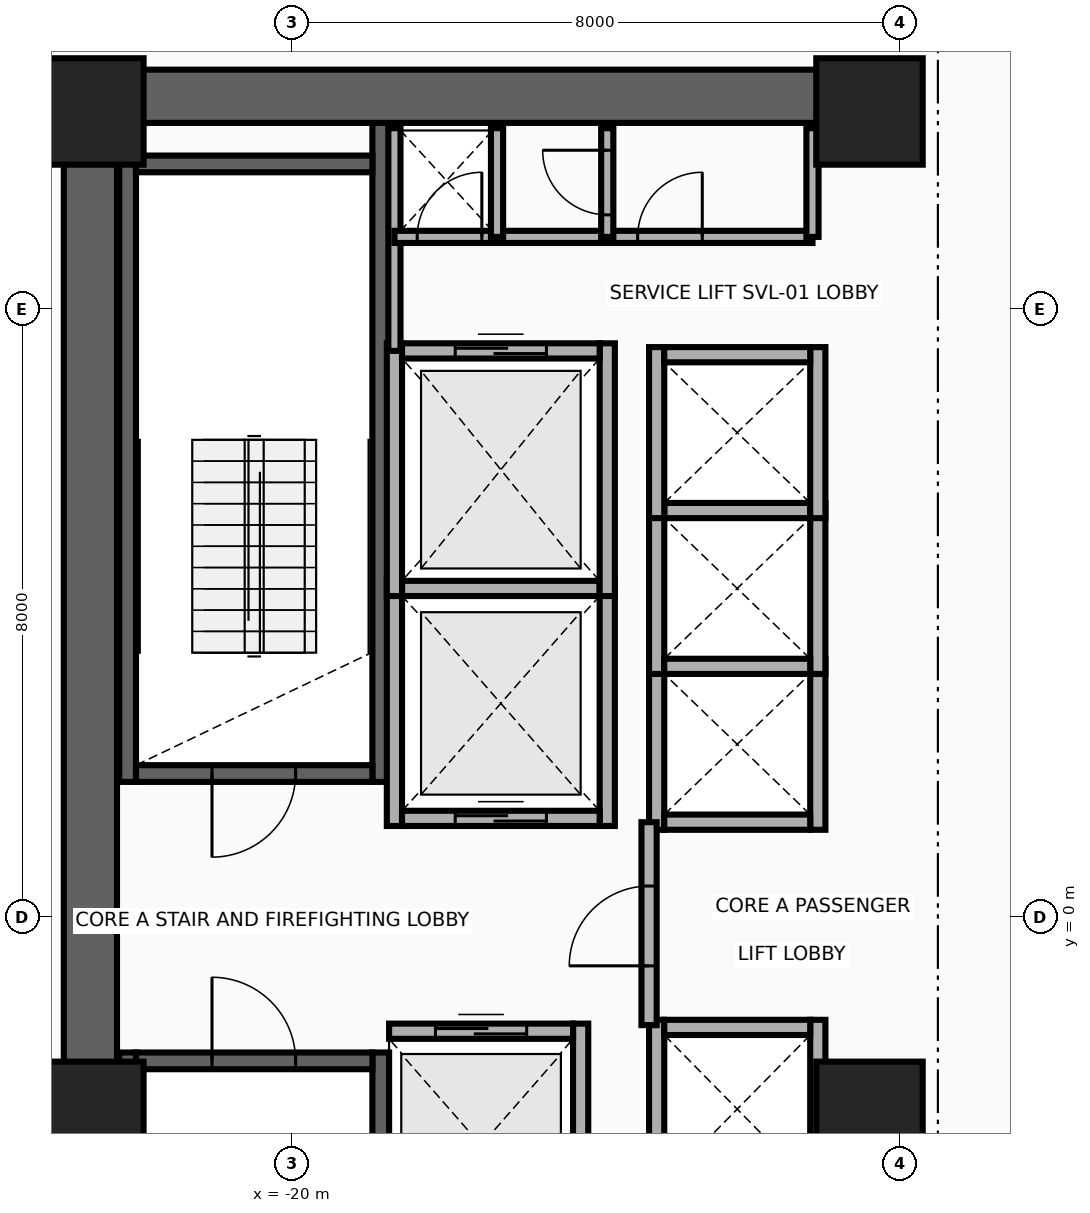
"""IFC4 building model, lengths in metres.
Left out: names, types, materials, properties, quantities, classifications, styles, units other than length and angle.
Written with IfcOpenShell. Run it as: python <this file> out.ifc"""

import sys

from ifc_helpers import new_model, si_unit, direction, frame, frame_2d, origin, origin_2d, place, context, subcontext, project, spatial, rectangle, extrude, source, transform, mapped, element, fill, save


model = new_model("IFC4")
c1 = context("Model", 3, precision=1e-05, world=origin(), true_north=direction((0.0, 1.0)))
c2 = subcontext(c1, "Body", "Model", "MODEL_VIEW")
j1 = project(units=[si_unit("LENGTHUNIT", "METRE"), si_unit("PLANEANGLEUNIT", "RADIAN")], contexts=[c1])
p1 = place(None, origin())
s1 = spatial("IfcSite", under=j1, at=p1, CompositionType="ELEMENT")
p2 = place(p1, origin())
s2 = spatial("IfcBuilding", under=s1, at=p2, CompositionType="ELEMENT")
p3 = place(p2, frame((0.0, 0.0, 88.9)))
s3 = spatial("IfcBuildingStorey", under=s2, at=p3, CompositionType="ELEMENT", Elevation=88.9)
for number, where, z_axis, x_axis in (
    (1, (-22.16, 1.78, 0.0), (0.0, 0.0, 1.0), (0.0, 1.0, 0.0)),
    (2, (-18.83, 1.78, 0.0), (0.0, 0.0, 1.0), (0.0, 1.0, 0.0)),
):
    element("IfcWall", number, at=place(p3, frame(where, z_axis=z_axis, x_axis=x_axis)), inside=s3, PredefinedType="SHEAR", context=c2, shape_type="SweptSolid", body=[
        extrude(rectangle(XDim=8.67, YDim=0.22, at=frame_2d((4.335, 0.0))), origin(), (0.0, 0.0, 1.0), 3.46),
    ])
p4 = place(p3, frame((-22.05, 1.89, 0.0), z_axis=(0.0, 0.0, 1.0), x_axis=(1.0, 0.0, 0.0)))
e3 = element("IfcWall", 3, at=p4, inside=s3, PredefinedType="SHEAR", context=c2, shape_type="SweptSolid", body=[
    extrude(rectangle(XDim=3.11, YDim=0.22, at=frame_2d((1.555, 0.0))), origin(), (0.0, 0.0, 1.0), 3.46),
])
p5 = place(p4, frame((1.0, 0.0, 0.0)))
e4 = element("IfcOpeningElement", 4, at=p5, cuts=e3, PredefinedType="OPENING", context=c2, shape_type="SweptSolid", body=[
    extrude(rectangle(XDim=1.1, YDim=2.15, at=frame_2d((0.55, 1.075))), frame((0.0, 0.125, 0.0), z_axis=(0.0, -1.0, 0.0), x_axis=(1.0, 0.0, 0.0)), (0.0, 0.0, 1.0), 0.25),
])
p6 = place(p3, frame((-22.05, 9.91, 0.0), z_axis=(0.0, 0.0, 1.0), x_axis=(1.0, 0.0, 0.0)))
e5 = element("IfcWall", 5, at=p6, inside=s3, PredefinedType="SHEAR", context=c2, shape_type="SweptSolid", body=[
    extrude(rectangle(XDim=3.11, YDim=0.22, at=frame_2d((1.555, 0.0))), origin(), (0.0, 0.0, 1.0), 3.46),
])
for number, where, z_axis, x_axis in (
    (6, (-22.16, -10.45, 0.0), (0.0, 0.0, 1.0), (0.0, 1.0, 0.0)),
    (7, (-18.83, -10.45, 0.0), (0.0, 0.0, 1.0), (0.0, 1.0, 0.0)),
):
    element("IfcWall", number, at=place(p3, frame(where, z_axis=z_axis, x_axis=x_axis)), inside=s3, PredefinedType="SHEAR", context=c2, shape_type="SweptSolid", body=[
        extrude(rectangle(XDim=8.67, YDim=0.22, at=frame_2d((4.335, 0.0))), origin(), (0.0, 0.0, 1.0), 3.46),
    ])
p7 = place(p3, frame((-22.05, -1.89, 0.0), z_axis=(0.0, 0.0, 1.0), x_axis=(1.0, 0.0, 0.0)))
e8 = element("IfcWall", 8, at=p7, inside=s3, PredefinedType="SHEAR", context=c2, shape_type="SweptSolid", body=[
    extrude(rectangle(XDim=3.11, YDim=0.22, at=frame_2d((1.555, 0.0))), origin(), (0.0, 0.0, 1.0), 3.46),
])
p8 = place(p7, frame((1.0, 0.0, 0.0)))
e9 = element("IfcOpeningElement", 9, at=p8, cuts=e8, PredefinedType="OPENING", context=c2, shape_type="SweptSolid", body=[
    extrude(rectangle(XDim=1.1, YDim=2.15, at=frame_2d((0.55, 1.075))), frame((0.0, 0.125, 0.0), z_axis=(0.0, -1.0, 0.0), x_axis=(1.0, 0.0, 0.0)), (0.0, 0.0, 1.0), 0.25),
])
p9 = place(p3, frame((-22.65, -11.15, 0.0), z_axis=(0.0, 0.0, 1.0), x_axis=(0.0, 1.0, 0.0)))
e10 = element("IfcWall", 10, at=p9, inside=s3, PredefinedType="SHEAR", context=c2, shape_type="SweptSolid", body=[
    extrude(rectangle(XDim=22.3, YDim=0.7, at=frame_2d((11.15, 0.0))), origin(), (0.0, 0.0, 1.0), 3.46),
])
p10 = place(p3, frame((-22.65, 10.8, 0.0), z_axis=(0.0, 0.0, 1.0), x_axis=(1.0, 0.0, 0.0)))
e11 = element("IfcWall", 11, at=p10, inside=s3, PredefinedType="SHEAR", context=c2, shape_type="SweptSolid", body=[
    extrude(rectangle(XDim=10.25, YDim=0.7, at=frame_2d((5.125, 0.0))), origin(), (0.0, 0.0, 1.0), 3.46),
])
m1 = source(origin(), c2, "Body", "SweptSolid", [
    extrude(rectangle(XDim=1.4, YDim=1.4, at=origin_2d()), origin(), (0.0, 0.0, 1.0), 3.7),
])
for number, where, z_axis, x_axis in (
    (12, (-22.65, -2.6, 0.0), (0.0, 0.0, 1.0), (1.0, 0.0, 0.0)),
    (13, (-12.4, -2.6, 0.0), (0.0, 0.0, 1.0), (1.0, 0.0, 0.0)),
    (14, (-22.65, 10.6, 0.0), (0.0, 0.0, 1.0), (1.0, 0.0, 0.0)),
    (15, (-12.4, 10.6, 0.0), (0.0, 0.0, 1.0), (1.0, 0.0, 0.0)),
):
    element("IfcColumn", number, at=place(p3, frame(where, z_axis=z_axis, x_axis=x_axis)), inside=s3, PredefinedType="COLUMN", context=c2, shape_type="MappedRepresentation", body=[
        mapped(m1, transform((0.0, 0.0, 0.0), x_axis=(1.0, 0.0, 0.0), y_axis=(0.0, 1.0, 0.0), z_axis=(0.0, 0.0, 1.0), scale=1.0)),
    ])
for number, where, z_axis, x_axis in (
    (16, (-18.65, 1.2, 0.0), (0.0, 0.0, 1.0), (0.0, 1.0, 0.0)),
    (17, (-15.85, 1.2, 0.0), (0.0, 0.0, 1.0), (0.0, 1.0, 0.0)),
):
    element("IfcWall", number, at=place(p3, frame(where, z_axis=z_axis, x_axis=x_axis)), inside=s3, PredefinedType="MOVABLE", context=c2, shape_type="SweptSolid", body=[
        extrude(rectangle(XDim=3.225, YDim=0.2, at=frame_2d((1.613, 0.0))), origin(), (0.0, 0.0, 1.0), 3.46),
    ])
p11 = place(p3, frame((-18.55, 1.3, 0.0), z_axis=(0.0, 0.0, 1.0), x_axis=(1.0, 0.0, 0.0)))
e18 = element("IfcWall", 18, at=p11, inside=s3, PredefinedType="MOVABLE", context=c2, shape_type="SweptSolid", body=[
    extrude(rectangle(XDim=2.6, YDim=0.2, at=frame_2d((1.3, 0.0))), origin(), (0.0, 0.0, 1.0), 3.46),
])
p12 = place(p11, frame((0.7, 0.0, 0.0)))
e19 = element("IfcOpeningElement", 19, at=p12, cuts=e18, PredefinedType="OPENING", context=c2, shape_type="SweptSolid", body=[
    extrude(rectangle(XDim=1.2, YDim=2.1, at=frame_2d((0.6, 1.05))), frame((0.0, 0.115, 0.0), z_axis=(0.0, -1.0, 0.0), x_axis=(1.0, 0.0, 0.0)), (0.0, 0.0, 1.0), 0.23),
])
p13 = place(p3, frame((-18.55, 4.325, 0.0), z_axis=(0.0, 0.0, 1.0), x_axis=(1.0, 0.0, 0.0)))
e20 = element("IfcWall", 20, at=p13, inside=s3, PredefinedType="MOVABLE", context=c2, shape_type="SweptSolid", body=[
    extrude(rectangle(XDim=2.6, YDim=0.2, at=frame_2d((1.3, 0.0))), origin(), (0.0, 0.0, 1.0), 3.46),
])
p14 = place(p3, frame((-16.2, -4.6, 0.0), z_axis=(0.0, 0.0, 1.0), x_axis=(0.0, 1.0, 0.0)))
e21 = element("IfcWall", 21, at=p14, inside=s3, PredefinedType="MOVABLE", context=c2, shape_type="SweptSolid", body=[
    extrude(rectangle(XDim=3.2, YDim=0.2, at=frame_2d((1.6, 0.0))), origin(), (0.0, 0.0, 1.0), 3.46),
])
p15 = place(p3, frame((-18.72, -1.5, 0.0), z_axis=(0.0, 0.0, 1.0), x_axis=(1.0, 0.0, 0.0)))
e22 = element("IfcWall", 22, at=p15, inside=s3, PredefinedType="MOVABLE", context=c2, shape_type="SweptSolid", body=[
    extrude(rectangle(XDim=2.42, YDim=0.2, at=frame_2d((1.21, 0.0))), origin(), (0.0, 0.0, 1.0), 3.46),
])
p16 = place(p15, frame((0.61, 0.0, 0.0)))
e23 = element("IfcOpeningElement", 23, at=p16, cuts=e22, PredefinedType="OPENING", context=c2, shape_type="SweptSolid", body=[
    extrude(rectangle(XDim=1.2, YDim=2.1, at=frame_2d((0.6, 1.05))), frame((0.0, 0.115, 0.0), z_axis=(0.0, -1.0, 0.0), x_axis=(1.0, 0.0, 0.0)), (0.0, 0.0, 1.0), 0.23),
])
for number, where, z_axis, x_axis in (
    (24, (-18.65, 4.225, 0.0), (0.0, 0.0, 1.0), (0.0, 1.0, 0.0)),
    (25, (-15.85, 4.225, 0.0), (0.0, 0.0, 1.0), (0.0, 1.0, 0.0)),
):
    element("IfcWall", number, at=place(p3, frame(where, z_axis=z_axis, x_axis=x_axis)), inside=s3, PredefinedType="MOVABLE", context=c2, shape_type="SweptSolid", body=[
        extrude(rectangle(XDim=3.325, YDim=0.2, at=frame_2d((1.663, 0.0))), origin(), (0.0, 0.0, 1.0), 3.46),
    ])
p17 = place(p3, frame((-18.55, 7.45, 0.0), z_axis=(0.0, 0.0, 1.0), x_axis=(1.0, 0.0, 0.0)))
e26 = element("IfcWall", 26, at=p17, inside=s3, PredefinedType="MOVABLE", context=c2, shape_type="SweptSolid", body=[
    extrude(rectangle(XDim=2.6, YDim=0.2, at=frame_2d((1.3, 0.0))), origin(), (0.0, 0.0, 1.0), 3.46),
])
p18 = place(p17, frame((0.7, 0.0, 0.0)))
e27 = element("IfcOpeningElement", 27, at=p18, cuts=e26, PredefinedType="OPENING", context=c2, shape_type="SweptSolid", body=[
    extrude(rectangle(XDim=1.2, YDim=2.1, at=frame_2d((0.6, 1.05))), frame((0.0, 0.115, 0.0), z_axis=(0.0, -1.0, 0.0), x_axis=(1.0, 0.0, 0.0)), (0.0, 0.0, 1.0), 0.23),
])
for number, where, z_axis, x_axis in (
    (28, (-15.2, 1.15, 0.0), (0.0, 0.0, 1.0), (0.0, 1.0, 0.0)),
    (29, (-13.08, 1.15, 0.0), (0.0, 0.0, 1.0), (0.0, 1.0, 0.0)),
):
    element("IfcWall", number, at=place(p3, frame(where, z_axis=z_axis, x_axis=x_axis)), inside=s3, PredefinedType="MOVABLE", context=c2, shape_type="SweptSolid", body=[
        extrude(rectangle(XDim=2.25, YDim=0.2, at=frame_2d((1.125, 0.0))), origin(), (0.0, 0.0, 1.0), 3.46),
    ])
p19 = place(p3, frame((-15.1, 1.25, 0.0), z_axis=(0.0, 0.0, 1.0), x_axis=(1.0, 0.0, 0.0)))
e30 = element("IfcWall", 30, at=p19, inside=s3, PredefinedType="MOVABLE", context=c2, shape_type="SweptSolid", body=[
    extrude(rectangle(XDim=1.92, YDim=0.2, at=frame_2d((0.96, 0.0))), origin(), (0.0, 0.0, 1.0), 3.46),
])
for number, where, z_axis, x_axis in (
    (31, (-15.2, 3.2, 0.0), (0.0, 0.0, 1.0), (0.0, 1.0, 0.0)),
    (32, (-13.08, 3.2, 0.0), (0.0, 0.0, 1.0), (0.0, 1.0, 0.0)),
):
    element("IfcWall", number, at=place(p3, frame(where, z_axis=z_axis, x_axis=x_axis)), inside=s3, PredefinedType="MOVABLE", context=c2, shape_type="SweptSolid", body=[
        extrude(rectangle(XDim=2.25, YDim=0.2, at=frame_2d((1.125, 0.0))), origin(), (0.0, 0.0, 1.0), 3.46),
    ])
for number, where, z_axis, x_axis in (
    (33, (-15.1, 3.3, 0.0), (0.0, 0.0, 1.0), (1.0, 0.0, 0.0)),
    (34, (-15.1, 5.35, 0.0), (0.0, 0.0, 1.0), (1.0, 0.0, 0.0)),
):
    element("IfcWall", number, at=place(p3, frame(where, z_axis=z_axis, x_axis=x_axis)), inside=s3, PredefinedType="MOVABLE", context=c2, shape_type="SweptSolid", body=[
        extrude(rectangle(XDim=1.92, YDim=0.2, at=frame_2d((0.96, 0.0))), origin(), (0.0, 0.0, 1.0), 3.46),
    ])
for number, where, z_axis, x_axis in (
    (35, (-15.2, 5.25, 0.0), (0.0, 0.0, 1.0), (0.0, 1.0, 0.0)),
    (36, (-13.08, 5.25, 0.0), (0.0, 0.0, 1.0), (0.0, 1.0, 0.0)),
):
    element("IfcWall", number, at=place(p3, frame(where, z_axis=z_axis, x_axis=x_axis)), inside=s3, PredefinedType="MOVABLE", context=c2, shape_type="SweptSolid", body=[
        extrude(rectangle(XDim=2.25, YDim=0.2, at=frame_2d((1.125, 0.0))), origin(), (0.0, 0.0, 1.0), 3.46),
    ])
p20 = place(p3, frame((-15.1, 7.4, 0.0), z_axis=(0.0, 0.0, 1.0), x_axis=(1.0, 0.0, 0.0)))
e37 = element("IfcWall", 37, at=p20, inside=s3, PredefinedType="MOVABLE", context=c2, shape_type="SweptSolid", body=[
    extrude(rectangle(XDim=1.92, YDim=0.2, at=frame_2d((0.96, 0.0))), origin(), (0.0, 0.0, 1.0), 3.46),
])
for number, where, z_axis, x_axis in (
    (38, (-15.2, -3.7, 0.0), (0.0, 0.0, 1.0), (0.0, 1.0, 0.0)),
    (39, (-13.08, -3.7, 0.0), (0.0, 0.0, 1.0), (0.0, 1.0, 0.0)),
):
    element("IfcWall", number, at=place(p3, frame(where, z_axis=z_axis, x_axis=x_axis)), inside=s3, PredefinedType="MOVABLE", context=c2, shape_type="SweptSolid", body=[
        extrude(rectangle(XDim=2.35, YDim=0.2, at=frame_2d((1.175, 0.0))), origin(), (0.0, 0.0, 1.0), 3.46),
    ])
p21 = place(p3, frame((-15.1, -1.45, 0.0), z_axis=(0.0, 0.0, 1.0), x_axis=(1.0, 0.0, 0.0)))
e40 = element("IfcWall", 40, at=p21, inside=s3, PredefinedType="MOVABLE", context=c2, shape_type="SweptSolid", body=[
    extrude(rectangle(XDim=1.92, YDim=0.2, at=frame_2d((0.96, 0.0))), origin(), (0.0, 0.0, 1.0), 3.46),
])
p22 = place(p3, frame((-15.3, -1.42, 0.0), z_axis=(0.0, 0.0, 1.0), x_axis=(0.0, 1.0, 0.0)))
e41 = element("IfcWall", 41, at=p22, inside=s3, PredefinedType="PARTITIONING", context=c2, shape_type="SweptSolid", body=[
    extrude(rectangle(XDim=2.67, YDim=0.2, at=frame_2d((1.335, 0.0))), origin(), (0.0, 0.0, 1.0), 3.46),
])
p23 = place(p22, frame((0.78, 0.0, 0.0)))
e42 = element("IfcOpeningElement", 42, at=p23, cuts=e41, PredefinedType="OPENING", context=c2, shape_type="SweptSolid", body=[
    extrude(rectangle(XDim=1.05, YDim=2.15, at=frame_2d((0.525, 1.075))), frame((0.0, 0.115, 0.0), z_axis=(0.0, -1.0, 0.0), x_axis=(1.0, 0.0, 0.0)), (0.0, 0.0, 1.0), 0.23),
])
p24 = place(p3, frame((-18.65, 7.45, 0.0), z_axis=(0.0, 0.0, 1.0), x_axis=(0.0, 1.0, 0.0)))
e43 = element("IfcWall", 43, at=p24, inside=s3, PredefinedType="PARTITIONING", context=c2, shape_type="SweptSolid", body=[
    extrude(rectangle(XDim=2.93, YDim=0.16, at=frame_2d((1.465, 0.0))), origin(), (0.0, 0.0, 1.0), 3.46),
])
p25 = place(p3, frame((-18.65, 8.95, 0.0), z_axis=(0.0, 0.0, 1.0), x_axis=(1.0, 0.0, 0.0)))
e44 = element("IfcWall", 44, at=p25, inside=s3, PredefinedType="PARTITIONING", context=c2, shape_type="SweptSolid", body=[
    extrude(rectangle(XDim=5.5, YDim=0.16, at=frame_2d((2.75, 0.0))), origin(), (0.0, 0.0, 1.0), 3.46),
])
p26 = place(p25, frame((0.3, 0.0, 0.0)))
e45 = element("IfcOpeningElement", 45, at=p26, cuts=e44, PredefinedType="OPENING", context=c2, shape_type="SweptSolid", body=[
    extrude(rectangle(XDim=0.85, YDim=2.05, at=frame_2d((0.425, 1.025))), frame((0.0, 0.095, 0.0), z_axis=(0.0, -1.0, 0.0), x_axis=(1.0, 0.0, 0.0)), (0.0, 0.0, 1.0), 0.19),
])
p27 = place(p25, frame((3.2, 0.0, 0.0)))
e46 = element("IfcOpeningElement", 46, at=p27, cuts=e44, PredefinedType="OPENING", context=c2, shape_type="SweptSolid", body=[
    extrude(rectangle(XDim=0.85, YDim=2.05, at=frame_2d((0.425, 1.025))), frame((0.0, 0.095, 0.0), z_axis=(0.0, -1.0, 0.0), x_axis=(1.0, 0.0, 0.0)), (0.0, 0.0, 1.0), 0.19),
])
for number, where, z_axis, x_axis in (
    (47, (-13.15, 8.95, 0.0), (0.0, 0.0, 1.0), (0.0, 1.0, 0.0)),
    (48, (-17.3, 8.95, 0.0), (0.0, 0.0, 1.0), (0.0, 1.0, 0.0)),
):
    element("IfcWall", number, at=place(p3, frame(where, z_axis=z_axis, x_axis=x_axis)), inside=s3, PredefinedType="PARTITIONING", context=c2, shape_type="SweptSolid", body=[
        extrude(rectangle(XDim=1.43, YDim=0.16, at=frame_2d((0.715, 0.0))), origin(), (0.0, 0.0, 1.0), 3.46),
    ])
p28 = place(p3, frame((-15.85, 8.95, 0.0), z_axis=(0.0, 0.0, 1.0), x_axis=(0.0, 1.0, 0.0)))
e49 = element("IfcWall", 49, at=p28, inside=s3, PredefinedType="PARTITIONING", context=c2, shape_type="SweptSolid", body=[
    extrude(rectangle(XDim=1.43, YDim=0.16, at=frame_2d((0.715, 0.0))), origin(), (0.0, 0.0, 1.0), 3.46),
])
p29 = place(p28, frame((0.29, 0.0, 0.0)))
e50 = element("IfcOpeningElement", 50, at=p29, cuts=e49, PredefinedType="OPENING", context=c2, shape_type="SweptSolid", body=[
    extrude(rectangle(XDim=0.85, YDim=2.05, at=frame_2d((0.425, 1.025))), frame((0.0, 0.095, 0.0), z_axis=(0.0, -1.0, 0.0), x_axis=(1.0, 0.0, 0.0)), (0.0, 0.0, 1.0), 0.19),
])
p30 = place(p12, origin())
e51 = element("IfcDoor", 51, at=p30, inside=s3, OperationType="DOUBLE_DOOR_SLIDING", PredefinedType="DOOR", context=c2, shape_type="SweptSolid", body=[
    extrude(rectangle(XDim=1.2, YDim=2.1, at=frame_2d((0.6, 1.05))), frame((0.0, 0.025, 0.0), z_axis=(0.0, -1.0, 0.0), x_axis=(1.0, 0.0, 0.0)), (0.0, 0.0, 1.0), 0.05),
])
fill(e19, e51)
p31 = place(p16, origin())
e52 = element("IfcDoor", 52, at=p31, inside=s3, OperationType="DOUBLE_DOOR_SLIDING", PredefinedType="DOOR", context=c2, shape_type="SweptSolid", body=[
    extrude(rectangle(XDim=1.2, YDim=2.1, at=frame_2d((0.6, 1.05))), frame((0.0, 0.025, 0.0), z_axis=(0.0, -1.0, 0.0), x_axis=(1.0, 0.0, 0.0)), (0.0, 0.0, 1.0), 0.05),
])
fill(e23, e52)
p32 = place(p18, origin())
e53 = element("IfcDoor", 53, at=p32, inside=s3, OperationType="DOUBLE_DOOR_SLIDING", PredefinedType="DOOR", context=c2, shape_type="SweptSolid", body=[
    extrude(rectangle(XDim=1.2, YDim=2.1, at=frame_2d((0.6, 1.05))), frame((0.0, 0.025, 0.0), z_axis=(0.0, -1.0, 0.0), x_axis=(1.0, 0.0, 0.0)), (0.0, 0.0, 1.0), 0.05),
])
fill(e27, e53)
p33 = place(p23, origin())
e54 = element("IfcDoor", 54, at=p33, inside=s3, OperationType="SINGLE_SWING_RIGHT", PredefinedType="DOOR", context=c2, shape_type="SweptSolid", body=[
    extrude(rectangle(XDim=1.05, YDim=2.15, at=frame_2d((0.525, 1.075))), frame((0.0, 0.025, 0.0), z_axis=(0.0, -1.0, 0.0), x_axis=(1.0, 0.0, 0.0)), (0.0, 0.0, 1.0), 0.05),
])
fill(e42, e54)
p34 = place(p5, frame((1.1, 0.0, 0.0), z_axis=(0.0, 0.0, 1.0), x_axis=(-1.0, 0.0, 0.0)))
e55 = element("IfcDoor", 55, at=p34, inside=s3, OperationType="SINGLE_SWING_LEFT", PredefinedType="DOOR", context=c2, shape_type="SweptSolid", body=[
    extrude(rectangle(XDim=1.1, YDim=2.15, at=frame_2d((0.55, 1.075))), frame((0.0, 0.025, 0.0), z_axis=(0.0, -1.0, 0.0), x_axis=(1.0, 0.0, 0.0)), (0.0, 0.0, 1.0), 0.05),
])
fill(e4, e55)
p35 = place(p8, origin())
e56 = element("IfcDoor", 56, at=p35, inside=s3, OperationType="SINGLE_SWING_RIGHT", PredefinedType="DOOR", context=c2, shape_type="SweptSolid", body=[
    extrude(rectangle(XDim=1.1, YDim=2.15, at=frame_2d((0.55, 1.075))), frame((0.0, 0.025, 0.0), z_axis=(0.0, -1.0, 0.0), x_axis=(1.0, 0.0, 0.0)), (0.0, 0.0, 1.0), 0.05),
])
fill(e9, e56)
p36 = place(p26, origin())
e57 = element("IfcDoor", 57, at=p36, inside=s3, OperationType="SINGLE_SWING_LEFT", PredefinedType="DOOR", context=c2, shape_type="SweptSolid", body=[
    extrude(rectangle(XDim=0.85, YDim=2.05, at=frame_2d((0.425, 1.025))), frame((0.0, 0.025, 0.0), z_axis=(0.0, -1.0, 0.0), x_axis=(1.0, 0.0, 0.0)), (0.0, 0.0, 1.0), 0.05),
])
fill(e45, e57)
p37 = place(p27, origin())
e58 = element("IfcDoor", 58, at=p37, inside=s3, OperationType="SINGLE_SWING_RIGHT", PredefinedType="DOOR", context=c2, shape_type="SweptSolid", body=[
    extrude(rectangle(XDim=0.85, YDim=2.05, at=frame_2d((0.425, 1.025))), frame((0.0, 0.025, 0.0), z_axis=(0.0, -1.0, 0.0), x_axis=(1.0, 0.0, 0.0)), (0.0, 0.0, 1.0), 0.05),
])
fill(e46, e58)
p38 = place(p29, origin())
e59 = element("IfcDoor", 59, at=p38, inside=s3, OperationType="SINGLE_SWING_LEFT", PredefinedType="DOOR", context=c2, shape_type="SweptSolid", body=[
    extrude(rectangle(XDim=0.85, YDim=2.05, at=frame_2d((0.425, 1.025))), frame((0.0, 0.025, 0.0), z_axis=(0.0, -1.0, 0.0), x_axis=(1.0, 0.0, 0.0)), (0.0, 0.0, 1.0), 0.05),
])
fill(e50, e59)
save(model, sys.argv[1])
